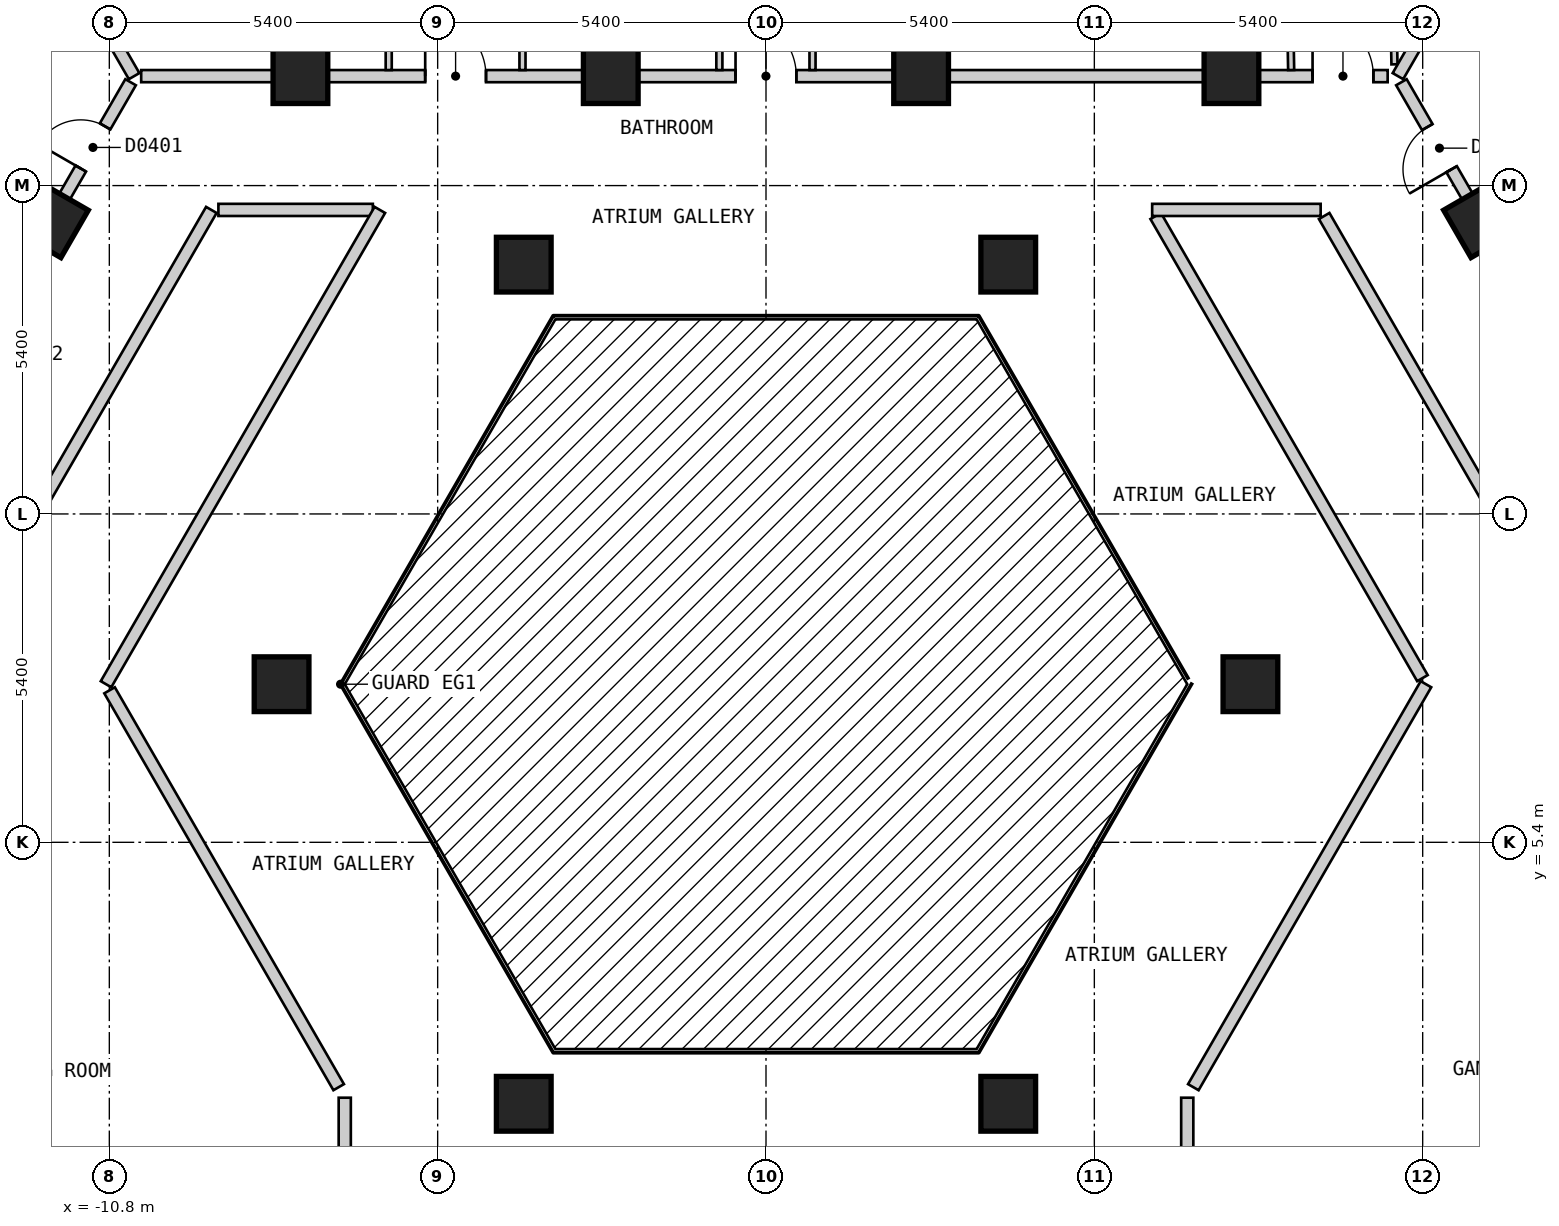
"""IFC4 building model, lengths in metres.
Left out: names, types, materials, properties, quantities, classifications, styles, units other than length and angle.
Written with IfcOpenShell. Run it as: python <this file> out.ifc"""

import sys

from ifc_helpers import new_model, si_unit, direction, frame, frame_2d, origin, origin_2d, place, context, subcontext, project, spatial, rectangle, extrude, element, fill, save


model = new_model("IFC4")
c1 = context("Model", 3, precision=1e-05, world=origin(), true_north=direction((0.0, 1.0)))
c2 = subcontext(c1, "Body", "Model", "MODEL_VIEW")
j1 = project(units=[si_unit("LENGTHUNIT", "METRE"), si_unit("PLANEANGLEUNIT", "RADIAN")], contexts=[c1])
p1 = place(None, origin())
s1 = spatial("IfcSite", under=j1, at=p1, CompositionType="ELEMENT")
p2 = place(p1, origin())
s2 = spatial("IfcBuilding", under=s1, at=p2, CompositionType="ELEMENT")
p3 = place(p2, frame((0.0, 0.0, 32.4)))
s3 = spatial("IfcBuildingStorey", under=s2, at=p3, CompositionType="ELEMENT", Elevation=32.4)
for number, where, z_axis, x_axis in (
    (1, (3.984, 1.1, 0.0), (0.0, 0.0, 1.0), (1.0, 0.0, 0.0)),
    (2, (7.967, 8.0, 0.0), (0.0, 0.0, 1.0), (1.0, 0.0, 0.0)),
    (3, (11.76, 15.631, 0.0), (0.0, 0.0, 1.0), (-0.5, 0.866, 0.0)),
    (4, (7.655, 18.0, 0.0), (0.0, 0.0, 1.0), (-1.0, 0.0, 0.0)),
    (5, (3.984, 14.9, 0.0), (0.0, 0.0, 1.0), (1.0, 0.0, 0.0)),
    (6, (2.551, 18.0, 0.0), (0.0, 0.0, 1.0), (-1.0, 0.0, 0.0)),
    (7, (-2.553, 18.0, 0.0), (0.0, 0.0, 1.0), (-1.0, 0.0, 0.0)),
    (8, (-3.984, 14.9, 0.0), (0.0, 0.0, 1.0), (1.0, 0.0, 0.0)),
    (9, (-7.657, 18.0, 0.0), (0.0, 0.0, 1.0), (-1.0, 0.0, 0.0)),
    (10, (-11.761, 15.63, 0.0), (0.0, 0.0, 1.0), (-0.5, -0.866, 0.0)),
    (11, (-7.967, 8.0, 0.0), (0.0, 0.0, 1.0), (1.0, 0.0, 0.0)),
    (12, (-3.984, 1.1, 0.0), (0.0, 0.0, 1.0), (1.0, 0.0, 0.0)),
):
    element("IfcColumn", number, at=place(p3, frame(where, z_axis=z_axis, x_axis=x_axis)), inside=s3, PredefinedType="COLUMN", context=c2, shape_type="SweptSolid", body=[
        extrude(rectangle(XDim=0.9, YDim=0.9, at=origin_2d()), origin(), (0.0, 0.0, 1.0), 3.0),
    ])
p4 = place(p3, frame((-10.796, 7.9, 0.0), z_axis=(0.0, 0.0, 1.0), x_axis=(0.499954271211, -0.866051803703, 0.0)))
e13 = element("IfcWall", 13, at=p4, inside=s3, PredefinedType="PARTITIONING", context=c2, shape_type="SweptSolid", body=[
    extrude(rectangle(XDim=7.536, YDim=0.2, at=frame_2d((3.768, 0.0))), origin(), (0.0, 0.0, 1.0), 2.7),
])
p5 = place(p3, frame((6.409, 15.7, 0.0), z_axis=(0.0, 0.0, 1.0), x_axis=(0.499930377127, -0.866065596838, 0.0)))
e14 = element("IfcWall", 14, at=p5, inside=s3, PredefinedType="PARTITIONING", context=c2, shape_type="SweptSolid", body=[
    extrude(rectangle(XDim=8.775, YDim=0.2, at=frame_2d((4.388, 0.0))), origin(), (0.0, 0.0, 1.0), 2.7),
])
p6 = place(p3, frame((9.18, 15.7, 0.0), z_axis=(0.0, 0.0, 1.0), x_axis=(0.500003652032, -0.866023295272, 0.0)))
e15 = element("IfcWall", 15, at=p6, inside=s3, PredefinedType="PARTITIONING", context=c2, shape_type="SweptSolid", body=[
    extrude(rectangle(XDim=18.012, YDim=0.2, at=frame_2d((9.006, 0.0))), origin(), (0.0, 0.0, 1.0), 2.7),
])
p7 = place(p6, frame((8.556, 0.0, 0.0)))
e16 = element("IfcOpeningElement", 16, at=p7, cuts=e15, PredefinedType="OPENING", context=c2, shape_type="SweptSolid", body=[
    extrude(rectangle(XDim=0.9, YDim=2.1, at=frame_2d((0.45, 1.05))), frame((0.0, 0.11, 0.0), z_axis=(0.0, -1.0, 0.0), x_axis=(1.0, 0.0, 0.0)), (0.0, 0.0, 1.0), 0.22),
])
p8 = place(p3, frame((10.45, 17.9, 0.0), z_axis=(0.0, 0.0, 1.0), x_axis=(0.500034352617, -0.866005569383, 0.0)))
e17 = element("IfcWall", 17, at=p8, inside=s3, PredefinedType="PARTITIONING", context=c2, shape_type="SweptSolid", body=[
    extrude(rectangle(XDim=20.553, YDim=0.2, at=frame_2d((10.276, 0.0))), origin(), (0.0, 0.0, 1.0), 2.7),
])
p9 = place(p8, frame((9.775, 0.0, 0.0)))
e18 = element("IfcOpeningElement", 18, at=p9, cuts=e17, PredefinedType="OPENING", context=c2, shape_type="SweptSolid", body=[
    extrude(rectangle(XDim=1.0, YDim=2.1, at=frame_2d((0.5, 1.05))), frame((0.0, 0.11, 0.0), z_axis=(0.0, -1.0, 0.0), x_axis=(1.0, 0.0, 0.0)), (0.0, 0.0, 1.0), 0.22),
])
p10 = place(p8, frame((0.852, 0.0, 0.0)))
e19 = element("IfcOpeningElement", 19, at=p10, cuts=e17, PredefinedType="OPENING", context=c2, shape_type="SweptSolid", body=[
    extrude(rectangle(XDim=0.8, YDim=2.1, at=frame_2d((0.4, 1.05))), frame((0.0, 0.11, 0.0), z_axis=(0.0, -1.0, 0.0), x_axis=(1.0, 0.0, 0.0)), (0.0, 0.0, 1.0), 0.22),
])
p11 = place(p3, frame((-9.006, 15.8, 0.0), z_axis=(0.0, 0.0, 1.0), x_axis=(1.0, 0.0, 0.0)))
e20 = element("IfcWall", 20, at=p11, inside=s3, PredefinedType="PARTITIONING", context=c2, shape_type="SweptSolid", body=[
    extrude(rectangle(XDim=2.54, YDim=0.2, at=frame_2d((1.27, 0.0))), origin(), (0.0, 0.0, 1.0), 2.7),
])
p12 = place(p3, frame((6.351, 15.8, 0.0), z_axis=(0.0, 0.0, 1.0), x_axis=(1.0, 0.0, 0.0)))
e21 = element("IfcWall", 21, at=p12, inside=s3, PredefinedType="PARTITIONING", context=c2, shape_type="SweptSolid", body=[
    extrude(rectangle(XDim=2.771, YDim=0.2, at=frame_2d((1.385, 0.0))), origin(), (0.0, 0.0, 1.0), 2.7),
])
p13 = place(p3, frame((-10.276, 18.0, 0.0), z_axis=(0.0, 0.0, 1.0), x_axis=(1.0, 0.0, 0.0)))
e22 = element("IfcWall", 22, at=p13, inside=s3, PredefinedType="PARTITIONING", context=c2, shape_type="SweptSolid", body=[
    extrude(rectangle(XDim=20.5, YDim=0.2, at=frame_2d((10.25, 0.0))), origin(), (0.0, 0.0, 1.0), 2.7),
])
p14 = place(p13, frame((19.265, 0.0, 0.0)))
e23 = element("IfcOpeningElement", 23, at=p14, cuts=e22, PredefinedType="OPENING", context=c2, shape_type="SweptSolid", body=[
    extrude(rectangle(XDim=1.0, YDim=2.1, at=frame_2d((0.5, 1.05))), frame((0.0, 0.11, 0.0), z_axis=(0.0, -1.0, 0.0), x_axis=(1.0, 0.0, 0.0)), (0.0, 0.0, 1.0), 0.22),
])
p15 = place(p13, frame((9.775, 0.0, 0.0)))
e24 = element("IfcOpeningElement", 24, at=p15, cuts=e22, PredefinedType="OPENING", context=c2, shape_type="SweptSolid", body=[
    extrude(rectangle(XDim=1.0, YDim=2.1, at=frame_2d((0.5, 1.05))), frame((0.0, 0.11, 0.0), z_axis=(0.0, -1.0, 0.0), x_axis=(1.0, 0.0, 0.0)), (0.0, 0.0, 1.0), 0.22),
])
p16 = place(p13, frame((4.671, 0.0, 0.0)))
e25 = element("IfcOpeningElement", 25, at=p16, cuts=e22, PredefinedType="OPENING", context=c2, shape_type="SweptSolid", body=[
    extrude(rectangle(XDim=1.0, YDim=2.1, at=frame_2d((0.5, 1.05))), frame((0.0, 0.11, 0.0), z_axis=(0.0, -1.0, 0.0), x_axis=(1.0, 0.0, 0.0)), (0.0, 0.0, 1.0), 0.22),
])
p17 = place(p3, frame((7.028, 1.373, 0.0), z_axis=(0.0, 0.0, 1.0), x_axis=(0.49998574534, 0.86603363356, 0.0)))
e26 = element("IfcWall", 26, at=p17, inside=s3, PredefinedType="PARTITIONING", context=c2, shape_type="SweptSolid", body=[
    extrude(rectangle(XDim=7.652, YDim=0.2, at=frame_2d((3.826, 0.0))), origin(), (0.0, 0.0, 1.0), 2.7),
])
p18 = place(p3, frame((-10.854, 8.0, 0.0), z_axis=(0.0, 0.0, 1.0), x_axis=(0.499964141897, 0.86604610548, 0.0)))
e27 = element("IfcWall", 27, at=p18, inside=s3, PredefinedType="PARTITIONING", context=c2, shape_type="SweptSolid", body=[
    extrude(rectangle(XDim=9.007, YDim=0.2, at=frame_2d((4.503, 0.0))), origin(), (0.0, 0.0, 1.0), 2.7),
])
p19 = place(p3, frame((-18.244, -0.001, 0.0), z_axis=(0.0, 0.0, 1.0), x_axis=(0.499962999376, 0.866046765051, 0.0)))
e28 = element("IfcWall", 28, at=p19, inside=s3, PredefinedType="PARTITIONING", context=c2, shape_type="SweptSolid", body=[
    extrude(rectangle(XDim=18.245, YDim=0.2, at=frame_2d((9.123, 0.0))), origin(), (0.0, 0.0, 1.0), 2.7),
])
p20 = place(p19, frame((8.672, 0.0, 0.0)))
e29 = element("IfcOpeningElement", 29, at=p20, cuts=e28, PredefinedType="OPENING", context=c2, shape_type="SweptSolid", body=[
    extrude(rectangle(XDim=0.9, YDim=2.1, at=frame_2d((0.45, 1.05))), frame((0.0, 0.11, 0.0), z_axis=(0.0, -1.0, 0.0), x_axis=(1.0, 0.0, 0.0)), (0.0, 0.0, 1.0), 0.22),
])
p21 = place(p3, frame((-20.727, 0.099, 0.0), z_axis=(0.0, 0.0, 1.0), x_axis=(0.499993204491, 0.866029327138, 0.0)))
e30 = element("IfcWall", 30, at=p21, inside=s3, PredefinedType="PARTITIONING", context=c2, shape_type="SweptSolid", body=[
    extrude(rectangle(XDim=20.554, YDim=0.2, at=frame_2d((10.277, 0.0))), origin(), (0.0, 0.0, 1.0), 2.7),
])
p22 = place(p21, frame((18.916, 0.0, 0.0)))
e31 = element("IfcOpeningElement", 31, at=p22, cuts=e30, PredefinedType="OPENING", context=c2, shape_type="SweptSolid", body=[
    extrude(rectangle(XDim=0.8, YDim=2.1, at=frame_2d((0.4, 1.05))), frame((0.0, 0.11, 0.0), z_axis=(0.0, -1.0, 0.0), x_axis=(1.0, 0.0, 0.0)), (0.0, 0.0, 1.0), 0.22),
])
p23 = place(p21, frame((14.88, 0.0, 0.0)))
e32 = element("IfcOpeningElement", 32, at=p23, cuts=e30, PredefinedType="OPENING", context=c2, shape_type="SweptSolid", body=[
    extrude(rectangle(XDim=1.0, YDim=2.1, at=frame_2d((0.5, 1.05))), frame((0.0, 0.11, 0.0), z_axis=(0.0, -1.0, 0.0), x_axis=(1.0, 0.0, 0.0)), (0.0, 0.0, 1.0), 0.22),
])
p24 = place(p21, frame((9.776, 0.0, 0.0)))
e33 = element("IfcOpeningElement", 33, at=p24, cuts=e30, PredefinedType="OPENING", context=c2, shape_type="SweptSolid", body=[
    extrude(rectangle(XDim=1.0, YDim=2.1, at=frame_2d((0.5, 1.05))), frame((0.0, 0.11, 0.0), z_axis=(0.0, -1.0, 0.0), x_axis=(1.0, 0.0, 0.0)), (0.0, 0.0, 1.0), 0.22),
])
p25 = place(p21, frame((4.673, 0.0, 0.0)))
e34 = element("IfcOpeningElement", 34, at=p25, cuts=e30, PredefinedType="OPENING", context=c2, shape_type="SweptSolid", body=[
    extrude(rectangle(XDim=1.0, YDim=2.1, at=frame_2d((0.5, 1.05))), frame((0.0, 0.11, 0.0), z_axis=(0.0, -1.0, 0.0), x_axis=(1.0, 0.0, 0.0)), (0.0, 0.0, 1.0), 0.22),
])
p26 = place(p21, frame((0.838, 0.0, 0.0)))
e35 = element("IfcOpeningElement", 35, at=p26, cuts=e30, PredefinedType="OPENING", context=c2, shape_type="SweptSolid", body=[
    extrude(rectangle(XDim=0.8, YDim=2.1, at=frame_2d((0.4, 1.05))), frame((0.0, 0.11, 0.0), z_axis=(0.0, -1.0, 0.0), x_axis=(1.0, 0.0, 0.0)), (0.0, 0.0, 1.0), 0.22),
])
for number, where, z_axis, x_axis in (
    (36, (6.928, -2.8, 0.0), (0.0, 0.0, 1.0), (0.0, 1.0, 0.0)),
    (37, (-6.928, -2.8, 0.0), (0.0, 0.0, 1.0), (0.0, 1.0, 0.0)),
):
    element("IfcWall", number, at=place(p3, frame(where, z_axis=z_axis, x_axis=x_axis)), inside=s3, PredefinedType="PARTITIONING", context=c2, shape_type="SweptSolid", body=[
        extrude(rectangle(XDim=4.0, YDim=0.2, at=frame_2d((2.0, 0.0))), origin(), (0.0, 0.0, 1.0), 2.7),
    ])
p27 = place(p3, frame((8.562, 22.15, 0.0), z_axis=(0.0, 0.0, 1.0), x_axis=(0.018504185939, -0.999828782894, 0.0)))
e38 = element("IfcWall", 38, at=p27, inside=s3, PredefinedType="PARTITIONING", context=c2, shape_type="SweptSolid", body=[
    extrude(rectangle(XDim=4.051, YDim=0.1, at=frame_2d((2.025, 0.0))), origin(), (0.0, 0.0, 1.0), 2.7),
])
p28 = place(p27, frame((1.65, 0.0, 0.0)))
e39 = element("IfcOpeningElement", 39, at=p28, cuts=e38, PredefinedType="OPENING", context=c2, shape_type="SweptSolid", body=[
    extrude(rectangle(XDim=0.8, YDim=2.1, at=frame_2d((0.4, 1.05))), frame((0.0, 0.06, 0.0), z_axis=(0.0, -1.0, 0.0), x_axis=(1.0, 0.0, 0.0)), (0.0, 0.0, 1.0), 0.12),
])
p29 = place(p3, frame((10.262, 22.15, 0.0), z_axis=(0.0, 0.0, 1.0), x_axis=(0.018696971826, -0.999825196344, 0.0)))
e40 = element("IfcWall", 40, at=p29, inside=s3, PredefinedType="PARTITIONING", context=c2, shape_type="SweptSolid", body=[
    extrude(rectangle(XDim=3.957, YDim=0.1, at=frame_2d((1.978, 0.0))), origin(), (0.0, 0.0, 1.0), 2.7),
])
p30 = place(p29, frame((1.6, 0.0, 0.0)))
e41 = element("IfcOpeningElement", 41, at=p30, cuts=e40, PredefinedType="OPENING", context=c2, shape_type="SweptSolid", body=[
    extrude(rectangle(XDim=0.9, YDim=2.1, at=frame_2d((0.45, 1.05))), frame((0.0, 0.06, 0.0), z_axis=(0.0, -1.0, 0.0), x_axis=(1.0, 0.0, 0.0)), (0.0, 0.0, 1.0), 0.12),
])
p31 = place(p3, frame((0.765, 20.609, 0.0), z_axis=(0.0, 0.0, 1.0), x_axis=(0.0, -1.0, 0.0)))
e42 = element("IfcWall", 42, at=p31, inside=s3, PredefinedType="PARTITIONING", context=c2, shape_type="SweptSolid", body=[
    extrude(rectangle(XDim=2.509, YDim=0.1, at=frame_2d((1.254, 0.0))), origin(), (0.0, 0.0, 1.0), 2.7),
])
p32 = place(p31, frame((0.829, 0.0, 0.0)))
e43 = element("IfcOpeningElement", 43, at=p32, cuts=e42, PredefinedType="OPENING", context=c2, shape_type="SweptSolid", body=[
    extrude(rectangle(XDim=0.9, YDim=2.1, at=frame_2d((0.45, 1.05))), frame((0.0, 0.06, 0.0), z_axis=(0.0, -1.0, 0.0), x_axis=(1.0, 0.0, 0.0)), (0.0, 0.0, 1.0), 0.12),
])
p33 = place(p3, frame((2.551, 18.1, 0.0), z_axis=(0.0, 0.0, 1.0), x_axis=(0.0, 1.0, 0.0)))
e44 = element("IfcWall", 44, at=p33, inside=s3, PredefinedType="PARTITIONING", context=c2, shape_type="SweptSolid", body=[
    extrude(rectangle(XDim=3.5, YDim=0.1, at=frame_2d((1.75, 0.0))), origin(), (0.0, 0.0, 1.0), 2.7),
])
p34 = place(p3, frame((-4.005, 18.1, 0.0), z_axis=(0.0, 0.0, 1.0), x_axis=(0.0, 1.0, 0.0)))
e45 = element("IfcWall", 45, at=p34, inside=s3, PredefinedType="PARTITIONING", context=c2, shape_type="SweptSolid", body=[
    extrude(rectangle(XDim=4.05, YDim=0.1, at=frame_2d((2.025, 0.0))), origin(), (0.0, 0.0, 1.0), 2.7),
])
p35 = place(p34, frame((1.6, 0.0, 0.0)))
e46 = element("IfcOpeningElement", 46, at=p35, cuts=e45, PredefinedType="OPENING", context=c2, shape_type="SweptSolid", body=[
    extrude(rectangle(XDim=0.8, YDim=2.1, at=frame_2d((0.4, 1.05))), frame((0.0, 0.06, 0.0), z_axis=(0.0, -1.0, 0.0), x_axis=(1.0, 0.0, 0.0)), (0.0, 0.0, 1.0), 0.12),
])
p36 = place(p3, frame((-6.205, 18.1, 0.0), z_axis=(0.0, 0.0, 1.0), x_axis=(0.0, 1.0, 0.0)))
e47 = element("IfcWall", 47, at=p36, inside=s3, PredefinedType="PARTITIONING", context=c2, shape_type="SweptSolid", body=[
    extrude(rectangle(XDim=4.05, YDim=0.1, at=frame_2d((2.025, 0.0))), origin(), (0.0, 0.0, 1.0), 2.7),
])
p37 = place(p36, frame((1.55, 0.0, 0.0)))
e48 = element("IfcOpeningElement", 48, at=p37, cuts=e47, PredefinedType="OPENING", context=c2, shape_type="SweptSolid", body=[
    extrude(rectangle(XDim=0.9, YDim=2.1, at=frame_2d((0.45, 1.05))), frame((0.0, 0.06, 0.0), z_axis=(0.0, -1.0, 0.0), x_axis=(1.0, 0.0, 0.0)), (0.0, 0.0, 1.0), 0.12),
])
p38 = place(p3, frame((-7.657, 18.1, 0.0), z_axis=(0.0, 0.0, 1.0), x_axis=(0.0, 1.0, 0.0)))
e49 = element("IfcWall", 49, at=p38, inside=s3, PredefinedType="PARTITIONING", context=c2, shape_type="SweptSolid", body=[
    extrude(rectangle(XDim=4.1, YDim=0.1, at=frame_2d((2.05, 0.0))), origin(), (0.0, 0.0, 1.0), 2.7),
])
p39 = place(p3, frame((-0.767, 18.1, 0.0), z_axis=(0.0, 0.0, 1.0), x_axis=(0.0, 1.0, 0.0)))
e50 = element("IfcWall", 50, at=p39, inside=s3, PredefinedType="PARTITIONING", context=c2, shape_type="SweptSolid", body=[
    extrude(rectangle(XDim=2.51, YDim=0.1, at=frame_2d((1.255, 0.0))), origin(), (0.0, 0.0, 1.0), 2.7),
])
p40 = place(p39, frame((0.83, 0.0, 0.0)))
e51 = element("IfcOpeningElement", 51, at=p40, cuts=e50, PredefinedType="OPENING", context=c2, shape_type="SweptSolid", body=[
    extrude(rectangle(XDim=0.8, YDim=2.1, at=frame_2d((0.4, 1.05))), frame((0.0, 0.06, 0.0), z_axis=(0.0, -1.0, 0.0), x_axis=(1.0, 0.0, 0.0)), (0.0, 0.0, 1.0), 0.12),
])
p41 = place(p3, frame((-12.659, 21.926, 0.0), z_axis=(0.0, 0.0, 1.0), x_axis=(0.500025458316, -0.86601070492, 0.0)))
e52 = element("IfcWall", 52, at=p41, inside=s3, PredefinedType="PARTITIONING", context=c2, shape_type="SweptSolid", body=[
    extrude(rectangle(XDim=4.533, YDim=0.2, at=frame_2d((2.267, 0.0))), origin(), (0.0, 0.0, 1.0), 2.7),
])
p42 = place(p3, frame((7.655, 21.62, 0.0), z_axis=(0.0, 0.0, 1.0), x_axis=(0.0, -1.0, 0.0)))
e53 = element("IfcWall", 53, at=p42, inside=s3, PredefinedType="PARTITIONING", context=c2, shape_type="SweptSolid", body=[
    extrude(rectangle(XDim=3.52, YDim=0.2, at=frame_2d((1.76, 0.0))), origin(), (0.0, 0.0, 1.0), 2.7),
])
p43 = place(p3, frame((10.393, 18.0, 0.0), z_axis=(0.0, 0.0, 1.0), x_axis=(0.499945497007, 0.866056868816, 0.0)))
e54 = element("IfcWall", 54, at=p43, inside=s3, PredefinedType="PARTITIONING", context=c2, shape_type="SweptSolid", body=[
    extrude(rectangle(XDim=10.265, YDim=0.2, at=frame_2d((5.132, 0.0))), origin(), (0.0, 0.0, 1.0), 2.7),
])
p44 = place(p3, frame((-2.553, 18.1, 0.0), z_axis=(0.0, 0.0, 1.0), x_axis=(0.0, 1.0, 0.0)))
e55 = element("IfcWall", 55, at=p44, inside=s3, PredefinedType="PARTITIONING", context=c2, shape_type="SweptSolid", body=[
    extrude(rectangle(XDim=2.56, YDim=0.2, at=frame_2d((1.28, 0.0))), origin(), (0.0, 0.0, 1.0), 2.7),
])
p45 = place(p22, origin())
e56 = element("IfcDoor", 56, at=p45, inside=s3, OperationType="SINGLE_SWING_LEFT", PredefinedType="DOOR", context=c2, shape_type="SweptSolid", body=[
    extrude(rectangle(XDim=0.8, YDim=2.1, at=frame_2d((0.4, 1.05))), frame((0.0, 0.025, 0.0), z_axis=(0.0, -1.0, 0.0), x_axis=(1.0, 0.0, 0.0)), (0.0, 0.0, 1.0), 0.05),
])
fill(e31, e56)
p46 = place(p10, origin())
e57 = element("IfcDoor", 57, at=p46, inside=s3, OperationType="SINGLE_SWING_RIGHT", PredefinedType="DOOR", context=c2, shape_type="SweptSolid", body=[
    extrude(rectangle(XDim=0.8, YDim=2.1, at=frame_2d((0.4, 1.05))), frame((0.0, 0.025, 0.0), z_axis=(0.0, -1.0, 0.0), x_axis=(1.0, 0.0, 0.0)), (0.0, 0.0, 1.0), 0.05),
])
fill(e19, e57)
p47 = place(p14, origin())
e58 = element("IfcDoor", 58, at=p47, inside=s3, OperationType="SINGLE_SWING_LEFT", PredefinedType="DOOR", context=c2, shape_type="SweptSolid", body=[
    extrude(rectangle(XDim=1.0, YDim=2.1, at=frame_2d((0.5, 1.05))), frame((0.0, 0.025, 0.0), z_axis=(0.0, -1.0, 0.0), x_axis=(1.0, 0.0, 0.0)), (0.0, 0.0, 1.0), 0.05),
])
fill(e23, e58)
p48 = place(p15, origin())
e59 = element("IfcDoor", 59, at=p48, inside=s3, OperationType="SINGLE_SWING_LEFT", PredefinedType="DOOR", context=c2, shape_type="SweptSolid", body=[
    extrude(rectangle(XDim=1.0, YDim=2.1, at=frame_2d((0.5, 1.05))), frame((0.0, 0.025, 0.0), z_axis=(0.0, -1.0, 0.0), x_axis=(1.0, 0.0, 0.0)), (0.0, 0.0, 1.0), 0.05),
])
fill(e24, e59)
p49 = place(p16, origin())
e60 = element("IfcDoor", 60, at=p49, inside=s3, OperationType="SINGLE_SWING_LEFT", PredefinedType="DOOR", context=c2, shape_type="SweptSolid", body=[
    extrude(rectangle(XDim=1.0, YDim=2.1, at=frame_2d((0.5, 1.05))), frame((0.0, 0.025, 0.0), z_axis=(0.0, -1.0, 0.0), x_axis=(1.0, 0.0, 0.0)), (0.0, 0.0, 1.0), 0.05),
])
fill(e25, e60)
save(model, sys.argv[1])
